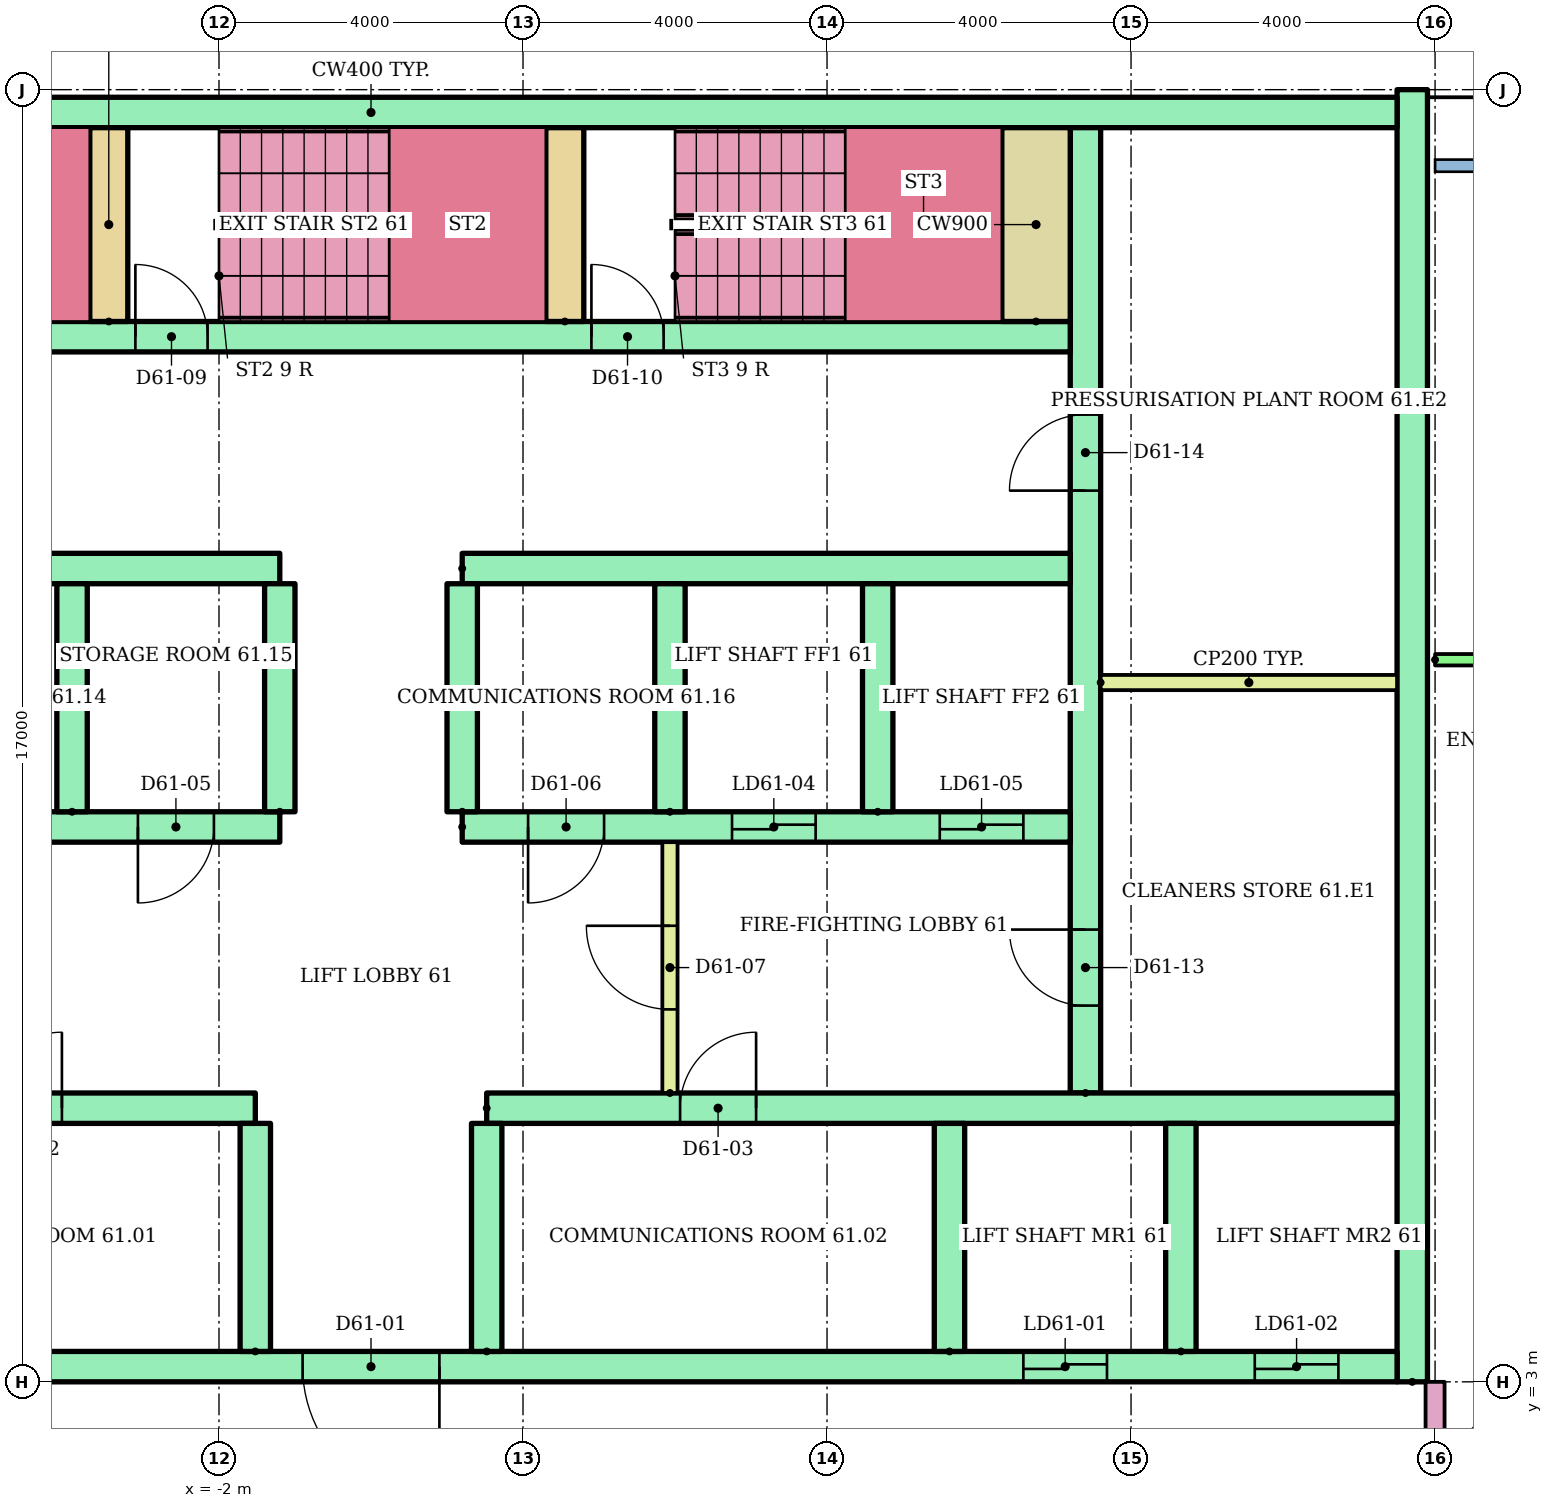
"""IFC4 building model, lengths in metres.
Left out: names, types, materials, properties, quantities, classifications, styles, units other than length and angle.
Written with IfcOpenShell. Run it as: python <this file> out.ifc"""

import sys

from ifc_helpers import new_model, si_unit, direction, frame, frame_2d, origin, place, context, subcontext, project, spatial, rectangle, extrude, element, fill, save


model = new_model("IFC4")
c1 = context("Model", 3, precision=1e-05, world=origin(), true_north=direction((0.0, 1.0)))
c2 = subcontext(c1, "Body", "Model", "MODEL_VIEW")
j1 = project(units=[si_unit("LENGTHUNIT", "METRE"), si_unit("PLANEANGLEUNIT", "RADIAN")], contexts=[c1])
p1 = place(None, origin())
s1 = spatial("IfcSite", under=j1, at=p1, CompositionType="ELEMENT")
p2 = place(p1, origin())
s2 = spatial("IfcBuilding", under=s1, at=p2, CompositionType="ELEMENT")
p3 = place(p2, frame((0.0, 0.0, 233.2)))
s3 = spatial("IfcBuildingStorey", under=s2, at=p3, CompositionType="ELEMENT", Elevation=233.2)
p4 = place(p3, frame((13.7, 3.0, 0.0), z_axis=(0.0, 0.0, 1.0), x_axis=(0.0, 1.0, 0.0)))
e1 = element("IfcWall", 1, at=p4, inside=s3, PredefinedType="SHEAR", context=c2, shape_type="SweptSolid", body=[
    extrude(rectangle(XDim=17.0, YDim=0.4, at=frame_2d((8.5, 0.0))), origin(), (0.0, 0.0, 1.0), 2.92),
])
p5 = place(p3, frame((-13.5, 19.7, 0.0)))
e2 = element("IfcWall", 2, at=p5, inside=s3, PredefinedType="SHEAR", context=c2, shape_type="SweptSolid", body=[
    extrude(rectangle(XDim=27.0, YDim=0.4, at=frame_2d((13.5, 0.0))), origin(), (0.0, 0.0, 1.0), 2.92),
])
p6 = place(p3, frame((9.4, 6.8, 0.0), z_axis=(0.0, 0.0, 1.0), x_axis=(0.0, 1.0, 0.0)))
e3 = element("IfcWall", 3, at=p6, inside=s3, PredefinedType="SHEAR", context=c2, shape_type="SweptSolid", body=[
    extrude(rectangle(XDim=12.7, YDim=0.4, at=frame_2d((6.35, 0.0))), origin(), (0.0, 0.0, 1.0), 2.92),
])
p7 = place(p6, frame((1.15, 0.0, 0.0)))
e4 = element("IfcOpeningElement", 4, at=p7, cuts=e3, PredefinedType="OPENING", context=c2, shape_type="SweptSolid", body=[
    extrude(rectangle(XDim=1.0, YDim=2.1, at=frame_2d((0.5, 1.05))), frame((0.0, 0.21, 0.0), z_axis=(0.0, -1.0, 0.0), x_axis=(1.0, 0.0, 0.0)), (0.0, 0.0, 1.0), 0.42),
])
p8 = place(p6, frame((7.925, 0.0, 0.0)))
e5 = element("IfcOpeningElement", 5, at=p8, cuts=e3, PredefinedType="OPENING", context=c2, shape_type="SweptSolid", body=[
    extrude(rectangle(XDim=1.0, YDim=2.1, at=frame_2d((0.5, 1.05))), frame((0.0, 0.21, 0.0), z_axis=(0.0, -1.0, 0.0), x_axis=(1.0, 0.0, 0.0)), (0.0, 0.0, 1.0), 0.42),
])
p9 = place(p3, frame((-13.5, 3.2, 0.0)))
e6 = element("IfcWall", 6, at=p9, inside=s3, PredefinedType="SHEAR", context=c2, shape_type="SweptSolid", body=[
    extrude(rectangle(XDim=27.0, YDim=0.4, at=frame_2d((13.5, 0.0))), origin(), (0.0, 0.0, 1.0), 2.92),
])
p10 = place(p9, frame((22.083, 0.0, 0.0)))
e7 = element("IfcOpeningElement", 7, at=p10, cuts=e6, PredefinedType="OPENING", context=c2, shape_type="SweptSolid", body=[
    extrude(rectangle(XDim=1.1, YDim=2.1, at=frame_2d((0.55, 1.05))), frame((0.0, 0.21, 0.0), z_axis=(0.0, -1.0, 0.0), x_axis=(1.0, 0.0, 0.0)), (0.0, 0.0, 1.0), 0.42),
])
p11 = place(p9, frame((25.128, 0.0, 0.0)))
e8 = element("IfcOpeningElement", 8, at=p11, cuts=e6, PredefinedType="OPENING", context=c2, shape_type="SweptSolid", body=[
    extrude(rectangle(XDim=1.1, YDim=2.1, at=frame_2d((0.55, 1.05))), frame((0.0, 0.21, 0.0), z_axis=(0.0, -1.0, 0.0), x_axis=(1.0, 0.0, 0.0)), (0.0, 0.0, 1.0), 0.42),
])
p12 = place(p9, frame((12.6, 0.0, 0.0)))
e9 = element("IfcOpeningElement", 9, at=p12, cuts=e6, PredefinedType="OPENING", context=c2, shape_type="SweptSolid", body=[
    extrude(rectangle(XDim=1.8, YDim=2.1, at=frame_2d((0.9, 1.05))), frame((0.0, 0.21, 0.0), z_axis=(0.0, -1.0, 0.0), x_axis=(1.0, 0.0, 0.0)), (0.0, 0.0, 1.0), 0.42),
])
p13 = place(p3, frame((-9.6, 6.6, 0.0)))
e10 = element("IfcWall", 10, at=p13, inside=s3, PredefinedType="SHEAR", context=c2, shape_type="SweptSolid", body=[
    extrude(rectangle(XDim=8.078, YDim=0.4, at=frame_2d((4.039, 0.0))), origin(), (0.0, 0.0, 1.0), 2.92),
])
p14 = place(p13, frame((4.533, 0.0, 0.0)))
e11 = element("IfcOpeningElement", 11, at=p14, cuts=e10, PredefinedType="OPENING", context=c2, shape_type="SweptSolid", body=[
    extrude(rectangle(XDim=1.0, YDim=2.1, at=frame_2d((0.5, 1.05))), frame((0.0, 0.21, 0.0), z_axis=(0.0, -1.0, 0.0), x_axis=(1.0, 0.0, 0.0)), (0.0, 0.0, 1.0), 0.42),
])
p15 = place(p3, frame((1.522, 6.6, 0.0)))
e12 = element("IfcWall", 12, at=p15, inside=s3, PredefinedType="SHEAR", context=c2, shape_type="SweptSolid", body=[
    extrude(rectangle(XDim=11.978, YDim=0.4, at=frame_2d((5.989, 0.0))), origin(), (0.0, 0.0, 1.0), 2.92),
])
p16 = place(p15, frame((2.544, 0.0, 0.0)))
e13 = element("IfcOpeningElement", 13, at=p16, cuts=e12, PredefinedType="OPENING", context=c2, shape_type="SweptSolid", body=[
    extrude(rectangle(XDim=1.0, YDim=2.1, at=frame_2d((0.5, 1.05))), frame((0.0, 0.21, 0.0), z_axis=(0.0, -1.0, 0.0), x_axis=(1.0, 0.0, 0.0)), (0.0, 0.0, 1.0), 0.42),
])
for number, where, z_axis, x_axis in (
    (14, (-1.522, 3.4, 0.0), (0.0, 0.0, 1.0), (0.0, 1.0, 0.0)),
    (15, (1.522, 3.4, 0.0), (0.0, 0.0, 1.0), (0.0, 1.0, 0.0)),
    (16, (7.611, 3.4, 0.0), (0.0, 0.0, 1.0), (0.0, 1.0, 0.0)),
    (17, (10.656, 3.4, 0.0), (0.0, 0.0, 1.0), (0.0, 1.0, 0.0)),
):
    element("IfcWall", number, at=place(p3, frame(where, z_axis=z_axis, x_axis=x_axis)), inside=s3, PredefinedType="SHEAR", context=c2, shape_type="SweptSolid", body=[
        extrude(rectangle(XDim=3.0, YDim=0.4, at=frame_2d((1.5, 0.0))), origin(), (0.0, 0.0, 1.0), 2.92),
    ])
p17 = place(p3, frame((-9.2, 10.3, 0.0)))
e18 = element("IfcWall", 18, at=p17, inside=s3, PredefinedType="SHEAR", context=c2, shape_type="SweptSolid", body=[
    extrude(rectangle(XDim=8.0, YDim=0.4, at=frame_2d((4.0, 0.0))), origin(), (0.0, 0.0, 1.0), 2.92),
])
p18 = place(p17, frame((0.617, 0.0, 0.0)))
e19 = element("IfcOpeningElement", 19, at=p18, cuts=e18, PredefinedType="OPENING", context=c2, shape_type="SweptSolid", body=[
    extrude(rectangle(XDim=1.1, YDim=2.1, at=frame_2d((0.55, 1.05))), frame((0.0, 0.21, 0.0), z_axis=(0.0, -1.0, 0.0), x_axis=(1.0, 0.0, 0.0)), (0.0, 0.0, 1.0), 0.42),
])
p19 = place(p17, frame((3.4, 0.0, 0.0)))
e20 = element("IfcOpeningElement", 20, at=p19, cuts=e18, PredefinedType="OPENING", context=c2, shape_type="SweptSolid", body=[
    extrude(rectangle(XDim=1.0, YDim=2.1, at=frame_2d((0.5, 1.05))), frame((0.0, 0.21, 0.0), z_axis=(0.0, -1.0, 0.0), x_axis=(1.0, 0.0, 0.0)), (0.0, 0.0, 1.0), 0.42),
])
p20 = place(p17, frame((6.133, 0.0, 0.0)))
e21 = element("IfcOpeningElement", 21, at=p20, cuts=e18, PredefinedType="OPENING", context=c2, shape_type="SweptSolid", body=[
    extrude(rectangle(XDim=1.0, YDim=2.1, at=frame_2d((0.5, 1.05))), frame((0.0, 0.21, 0.0), z_axis=(0.0, -1.0, 0.0), x_axis=(1.0, 0.0, 0.0)), (0.0, 0.0, 1.0), 0.42),
])
p21 = place(p3, frame((-9.2, 13.7, 0.0)))
e22 = element("IfcWall", 22, at=p21, inside=s3, PredefinedType="SHEAR", context=c2, shape_type="SweptSolid", body=[
    extrude(rectangle(XDim=8.0, YDim=0.4, at=frame_2d((4.0, 0.0))), origin(), (0.0, 0.0, 1.0), 2.92),
])
p22 = place(p3, frame((1.2, 10.3, 0.0)))
e23 = element("IfcWall", 23, at=p22, inside=s3, PredefinedType="SHEAR", context=c2, shape_type="SweptSolid", body=[
    extrude(rectangle(XDim=8.0, YDim=0.4, at=frame_2d((4.0, 0.0))), origin(), (0.0, 0.0, 1.0), 2.92),
])
p23 = place(p22, frame((3.55, 0.0, 0.0)))
e24 = element("IfcOpeningElement", 24, at=p23, cuts=e23, PredefinedType="OPENING", context=c2, shape_type="SweptSolid", body=[
    extrude(rectangle(XDim=1.1, YDim=2.1, at=frame_2d((0.55, 1.05))), frame((0.0, 0.21, 0.0), z_axis=(0.0, -1.0, 0.0), x_axis=(1.0, 0.0, 0.0)), (0.0, 0.0, 1.0), 0.42),
])
p24 = place(p22, frame((6.283, 0.0, 0.0)))
e25 = element("IfcOpeningElement", 25, at=p24, cuts=e23, PredefinedType="OPENING", context=c2, shape_type="SweptSolid", body=[
    extrude(rectangle(XDim=1.1, YDim=2.1, at=frame_2d((0.55, 1.05))), frame((0.0, 0.21, 0.0), z_axis=(0.0, -1.0, 0.0), x_axis=(1.0, 0.0, 0.0)), (0.0, 0.0, 1.0), 0.42),
])
p25 = place(p22, frame((0.867, 0.0, 0.0)))
e26 = element("IfcOpeningElement", 26, at=p25, cuts=e23, PredefinedType="OPENING", context=c2, shape_type="SweptSolid", body=[
    extrude(rectangle(XDim=1.0, YDim=2.1, at=frame_2d((0.5, 1.05))), frame((0.0, 0.21, 0.0), z_axis=(0.0, -1.0, 0.0), x_axis=(1.0, 0.0, 0.0)), (0.0, 0.0, 1.0), 0.42),
])
p26 = place(p3, frame((1.2, 13.7, 0.0)))
e27 = element("IfcWall", 27, at=p26, inside=s3, PredefinedType="SHEAR", context=c2, shape_type="SweptSolid", body=[
    extrude(rectangle(XDim=8.0, YDim=0.4, at=frame_2d((4.0, 0.0))), origin(), (0.0, 0.0, 1.0), 2.92),
])
for number, where, z_axis, x_axis in (
    (28, (-3.933, 10.5, 0.0), (0.0, 0.0, 1.0), (0.0, 1.0, 0.0)),
    (29, (-1.2, 10.5, 0.0), (0.0, 0.0, 1.0), (0.0, 1.0, 0.0)),
    (30, (1.2, 10.5, 0.0), (0.0, 0.0, 1.0), (0.0, 1.0, 0.0)),
    (31, (3.933, 10.5, 0.0), (0.0, 0.0, 1.0), (0.0, 1.0, 0.0)),
    (32, (6.667, 10.5, 0.0), (0.0, 0.0, 1.0), (0.0, 1.0, 0.0)),
):
    element("IfcWall", number, at=place(p3, frame(where, z_axis=z_axis, x_axis=x_axis)), inside=s3, PredefinedType="SHEAR", context=c2, shape_type="SweptSolid", body=[
        extrude(rectangle(XDim=3.0, YDim=0.4, at=frame_2d((1.5, 0.0))), origin(), (0.0, 0.0, 1.0), 2.92),
    ])
p27 = place(p3, frame((3.933, 6.8, 0.0), z_axis=(0.0, 0.0, 1.0), x_axis=(0.0, 1.0, 0.0)))
e33 = element("IfcWall", 33, at=p27, inside=s3, PredefinedType="PARTITIONING", context=c2, shape_type="SweptSolid", body=[
    extrude(rectangle(XDim=3.3, YDim=0.2, at=frame_2d((1.65, 0.0))), origin(), (0.0, 0.0, 1.0), 2.92),
])
p28 = place(p27, frame((1.1, 0.0, 0.0)))
e34 = element("IfcOpeningElement", 34, at=p28, cuts=e33, PredefinedType="OPENING", context=c2, shape_type="SweptSolid", body=[
    extrude(rectangle(XDim=1.1, YDim=2.1, at=frame_2d((0.55, 1.05))), frame((0.0, 0.11, 0.0), z_axis=(0.0, -1.0, 0.0), x_axis=(1.0, 0.0, 0.0)), (0.0, 0.0, 1.0), 0.22),
])
p29 = place(p3, frame((-9.2, 16.75, 0.0)))
e35 = element("IfcWall", 35, at=p29, inside=s3, PredefinedType="SHEAR", context=c2, shape_type="SweptSolid", body=[
    extrude(rectangle(XDim=18.4, YDim=0.4, at=frame_2d((9.2, 0.0))), origin(), (0.0, 0.0, 1.0), 2.92),
])
p30 = place(p29, frame((0.1, 0.0, 0.0)))
e36 = element("IfcOpeningElement", 36, at=p30, cuts=e35, PredefinedType="OPENING", context=c2, shape_type="SweptSolid", body=[
    extrude(rectangle(XDim=0.95, YDim=2.1, at=frame_2d((0.475, 1.05))), frame((0.0, 0.21, 0.0), z_axis=(0.0, -1.0, 0.0), x_axis=(1.0, 0.0, 0.0)), (0.0, 0.0, 1.0), 0.42),
])
p31 = place(p29, frame((6.1, 0.0, 0.0)))
e37 = element("IfcOpeningElement", 37, at=p31, cuts=e35, PredefinedType="OPENING", context=c2, shape_type="SweptSolid", body=[
    extrude(rectangle(XDim=0.95, YDim=2.1, at=frame_2d((0.475, 1.05))), frame((0.0, 0.21, 0.0), z_axis=(0.0, -1.0, 0.0), x_axis=(1.0, 0.0, 0.0)), (0.0, 0.0, 1.0), 0.42),
])
p32 = place(p29, frame((12.1, 0.0, 0.0)))
e38 = element("IfcOpeningElement", 38, at=p32, cuts=e35, PredefinedType="OPENING", context=c2, shape_type="SweptSolid", body=[
    extrude(rectangle(XDim=0.95, YDim=2.1, at=frame_2d((0.475, 1.05))), frame((0.0, 0.21, 0.0), z_axis=(0.0, -1.0, 0.0), x_axis=(1.0, 0.0, 0.0)), (0.0, 0.0, 1.0), 0.42),
])
for number, where, z_axis, x_axis in (
    (39, (-3.45, 16.95, 0.0), (0.0, 0.0, 1.0), (0.0, 1.0, 0.0)),
    (40, (2.55, 16.95, 0.0), (0.0, 0.0, 1.0), (0.0, 1.0, 0.0)),
):
    element("IfcWall", number, at=place(p3, frame(where, z_axis=z_axis, x_axis=x_axis)), inside=s3, PredefinedType="SHEAR", context=c2, shape_type="SweptSolid", body=[
        extrude(rectangle(XDim=2.55, YDim=0.5, at=frame_2d((1.275, 0.0))), origin(), (0.0, 0.0, 1.0), 2.92),
    ])
p33 = place(p3, frame((8.75, 16.95, 0.0), z_axis=(0.0, 0.0, 1.0), x_axis=(0.0, 1.0, 0.0)))
e41 = element("IfcWall", 41, at=p33, inside=s3, PredefinedType="SHEAR", context=c2, shape_type="SweptSolid", body=[
    extrude(rectangle(XDim=2.55, YDim=0.9, at=frame_2d((1.275, 0.0))), origin(), (0.0, 0.0, 1.0), 2.92),
])
p34 = place(p3, frame((9.6, 12.2, 0.0)))
e42 = element("IfcWall", 42, at=p34, inside=s3, PredefinedType="PARTITIONING", context=c2, shape_type="SweptSolid", body=[
    extrude(rectangle(XDim=3.9, YDim=0.2, at=frame_2d((1.95, 0.0))), origin(), (0.0, 0.0, 1.0), 2.92),
])
p35 = place(p3, frame((14.0, 12.5, 0.0)))
e43 = element("IfcWall", 43, at=p35, inside=s3, PredefinedType="PARTITIONING", context=c2, shape_type="SweptSolid", body=[
    extrude(rectangle(XDim=14.92, YDim=0.15, at=frame_2d((7.46, 0.0))), origin(), (0.0, 0.0, 1.0), 2.4),
])
p36 = place(p35, frame((4.6, 0.0, 0.0)))
e44 = element("IfcOpeningElement", 44, at=p36, cuts=e43, PredefinedType="OPENING", context=c2, shape_type="SweptSolid", body=[
    extrude(rectangle(XDim=1.0, YDim=2.1, at=frame_2d((0.5, 1.05))), frame((0.0, 0.085, 0.0), z_axis=(0.0, -1.0, 0.0), x_axis=(1.0, 0.0, 0.0)), (0.0, 0.0, 1.0), 0.17),
])
p37 = place(p35, frame((12.476, 0.0, 0.0)))
e45 = element("IfcOpeningElement", 45, at=p37, cuts=e43, PredefinedType="OPENING", context=c2, shape_type="SweptSolid", body=[
    extrude(rectangle(XDim=0.9, YDim=2.1, at=frame_2d((0.45, 1.05))), frame((0.0, 0.085, 0.0), z_axis=(0.0, -1.0, 0.0), x_axis=(1.0, 0.0, 0.0)), (0.0, 0.0, 1.0), 0.17),
])
p38 = place(p3, frame((14.0, 1.4, 0.0), z_axis=(0.0, 0.0, 1.0), x_axis=(0.0, 1.0, 0.0)))
e46 = element("IfcWall", 46, at=p38, inside=s3, PredefinedType="PARTITIONING", context=c2, shape_type="SweptSolid", body=[
    extrude(rectangle(XDim=1.6, YDim=0.25, at=frame_2d((0.8, 0.0))), origin(), (0.0, 0.0, 1.0), 2.4),
])
p39 = place(p10, origin())
e47 = element("IfcDoor", 47, at=p39, inside=s3, OperationType="SLIDING_TO_LEFT", PredefinedType="DOOR", context=c2, shape_type="SweptSolid", body=[
    extrude(rectangle(XDim=1.1, YDim=2.1, at=frame_2d((0.55, 1.05))), frame((0.0, 0.025, 0.0), z_axis=(0.0, -1.0, 0.0), x_axis=(1.0, 0.0, 0.0)), (0.0, 0.0, 1.0), 0.05),
])
fill(e7, e47)
p40 = place(p11, origin())
e48 = element("IfcDoor", 48, at=p40, inside=s3, OperationType="SLIDING_TO_LEFT", PredefinedType="DOOR", context=c2, shape_type="SweptSolid", body=[
    extrude(rectangle(XDim=1.1, YDim=2.1, at=frame_2d((0.55, 1.05))), frame((0.0, 0.025, 0.0), z_axis=(0.0, -1.0, 0.0), x_axis=(1.0, 0.0, 0.0)), (0.0, 0.0, 1.0), 0.05),
])
fill(e8, e48)
p41 = place(p12, frame((1.8, 0.0, 0.0), z_axis=(0.0, 0.0, 1.0), x_axis=(-1.0, 0.0, 0.0)))
e49 = element("IfcDoor", 49, at=p41, inside=s3, OperationType="DOUBLE_DOOR_SINGLE_SWING", PredefinedType="DOOR", context=c2, shape_type="SweptSolid", body=[
    extrude(rectangle(XDim=1.8, YDim=2.1, at=frame_2d((0.9, 1.05))), frame((0.0, 0.025, 0.0), z_axis=(0.0, -1.0, 0.0), x_axis=(1.0, 0.0, 0.0)), (0.0, 0.0, 1.0), 0.05),
])
fill(e9, e49)
p42 = place(p14, origin())
e50 = element("IfcDoor", 50, at=p42, inside=s3, OperationType="SINGLE_SWING_RIGHT", PredefinedType="DOOR", context=c2, shape_type="SweptSolid", body=[
    extrude(rectangle(XDim=1.0, YDim=2.1, at=frame_2d((0.5, 1.05))), frame((0.0, 0.025, 0.0), z_axis=(0.0, -1.0, 0.0), x_axis=(1.0, 0.0, 0.0)), (0.0, 0.0, 1.0), 0.05),
])
fill(e11, e50)
p43 = place(p16, origin())
e51 = element("IfcDoor", 51, at=p43, inside=s3, OperationType="SINGLE_SWING_RIGHT", PredefinedType="DOOR", context=c2, shape_type="SweptSolid", body=[
    extrude(rectangle(XDim=1.0, YDim=2.1, at=frame_2d((0.5, 1.05))), frame((0.0, 0.025, 0.0), z_axis=(0.0, -1.0, 0.0), x_axis=(1.0, 0.0, 0.0)), (0.0, 0.0, 1.0), 0.05),
])
fill(e13, e51)
p44 = place(p23, origin())
e52 = element("IfcDoor", 52, at=p44, inside=s3, OperationType="SLIDING_TO_LEFT", PredefinedType="DOOR", context=c2, shape_type="SweptSolid", body=[
    extrude(rectangle(XDim=1.1, YDim=2.1, at=frame_2d((0.55, 1.05))), frame((0.0, 0.025, 0.0), z_axis=(0.0, -1.0, 0.0), x_axis=(1.0, 0.0, 0.0)), (0.0, 0.0, 1.0), 0.05),
])
fill(e24, e52)
p45 = place(p24, origin())
e53 = element("IfcDoor", 53, at=p45, inside=s3, OperationType="SLIDING_TO_LEFT", PredefinedType="DOOR", context=c2, shape_type="SweptSolid", body=[
    extrude(rectangle(XDim=1.1, YDim=2.1, at=frame_2d((0.55, 1.05))), frame((0.0, 0.025, 0.0), z_axis=(0.0, -1.0, 0.0), x_axis=(1.0, 0.0, 0.0)), (0.0, 0.0, 1.0), 0.05),
])
fill(e25, e53)
p46 = place(p20, frame((1.0, 0.0, 0.0), z_axis=(0.0, 0.0, 1.0), x_axis=(-1.0, 0.0, 0.0)))
e54 = element("IfcDoor", 54, at=p46, inside=s3, OperationType="SINGLE_SWING_LEFT", PredefinedType="DOOR", context=c2, shape_type="SweptSolid", body=[
    extrude(rectangle(XDim=1.0, YDim=2.1, at=frame_2d((0.5, 1.05))), frame((0.0, 0.025, 0.0), z_axis=(0.0, -1.0, 0.0), x_axis=(1.0, 0.0, 0.0)), (0.0, 0.0, 1.0), 0.05),
])
fill(e21, e54)
p47 = place(p25, frame((1.0, 0.0, 0.0), z_axis=(0.0, 0.0, 1.0), x_axis=(-1.0, 0.0, 0.0)))
e55 = element("IfcDoor", 55, at=p47, inside=s3, OperationType="SINGLE_SWING_LEFT", PredefinedType="DOOR", context=c2, shape_type="SweptSolid", body=[
    extrude(rectangle(XDim=1.0, YDim=2.1, at=frame_2d((0.5, 1.05))), frame((0.0, 0.025, 0.0), z_axis=(0.0, -1.0, 0.0), x_axis=(1.0, 0.0, 0.0)), (0.0, 0.0, 1.0), 0.05),
])
fill(e26, e55)
p48 = place(p28, origin())
e56 = element("IfcDoor", 56, at=p48, inside=s3, OperationType="SINGLE_SWING_RIGHT", PredefinedType="DOOR", context=c2, shape_type="SweptSolid", body=[
    extrude(rectangle(XDim=1.1, YDim=2.1, at=frame_2d((0.55, 1.05))), frame((0.0, 0.025, 0.0), z_axis=(0.0, -1.0, 0.0), x_axis=(1.0, 0.0, 0.0)), (0.0, 0.0, 1.0), 0.05),
])
fill(e34, e56)
p49 = place(p31, origin())
e57 = element("IfcDoor", 57, at=p49, inside=s3, OperationType="SINGLE_SWING_LEFT", PredefinedType="DOOR", context=c2, shape_type="SweptSolid", body=[
    extrude(rectangle(XDim=0.95, YDim=2.1, at=frame_2d((0.475, 1.05))), frame((0.0, 0.025, 0.0), z_axis=(0.0, -1.0, 0.0), x_axis=(1.0, 0.0, 0.0)), (0.0, 0.0, 1.0), 0.05),
])
fill(e37, e57)
p50 = place(p32, origin())
e58 = element("IfcDoor", 58, at=p50, inside=s3, OperationType="SINGLE_SWING_LEFT", PredefinedType="DOOR", context=c2, shape_type="SweptSolid", body=[
    extrude(rectangle(XDim=0.95, YDim=2.1, at=frame_2d((0.475, 1.05))), frame((0.0, 0.025, 0.0), z_axis=(0.0, -1.0, 0.0), x_axis=(1.0, 0.0, 0.0)), (0.0, 0.0, 1.0), 0.05),
])
fill(e38, e58)
p51 = place(p7, origin())
e59 = element("IfcDoor", 59, at=p51, inside=s3, OperationType="SINGLE_SWING_RIGHT", PredefinedType="DOOR", context=c2, shape_type="SweptSolid", body=[
    extrude(rectangle(XDim=1.0, YDim=2.1, at=frame_2d((0.5, 1.05))), frame((0.0, 0.025, 0.0), z_axis=(0.0, -1.0, 0.0), x_axis=(1.0, 0.0, 0.0)), (0.0, 0.0, 1.0), 0.05),
])
fill(e4, e59)
p52 = place(p8, origin())
e60 = element("IfcDoor", 60, at=p52, inside=s3, OperationType="SINGLE_SWING_LEFT", PredefinedType="DOOR", context=c2, shape_type="SweptSolid", body=[
    extrude(rectangle(XDim=1.0, YDim=2.1, at=frame_2d((0.5, 1.05))), frame((0.0, 0.025, 0.0), z_axis=(0.0, -1.0, 0.0), x_axis=(1.0, 0.0, 0.0)), (0.0, 0.0, 1.0), 0.05),
])
fill(e5, e60)
save(model, sys.argv[1])
